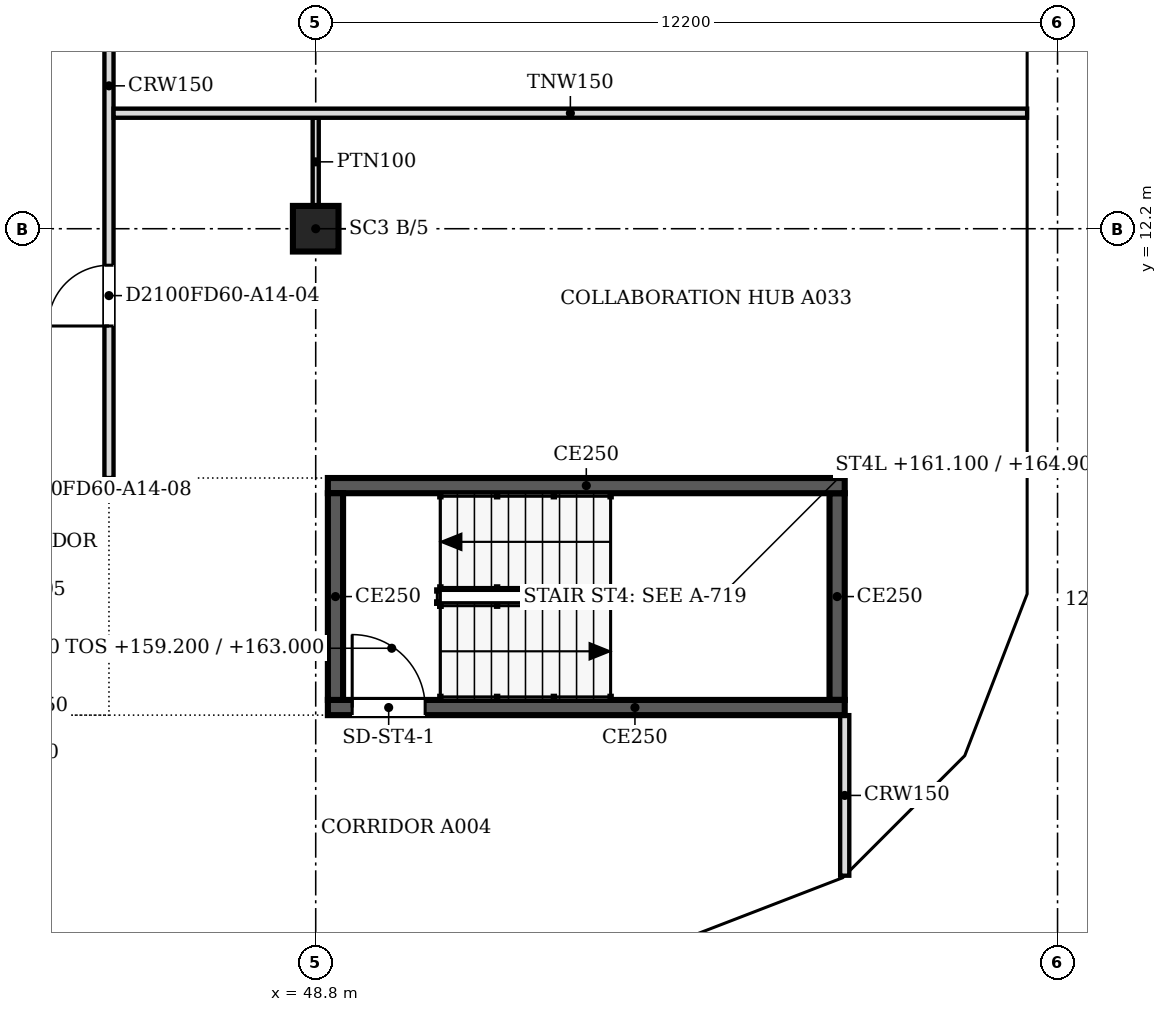
"""IFC4 building model, lengths in metres.
Left out: names, types, materials, properties, quantities, classifications, styles, units other than length and angle.
Written with IfcOpenShell. Run it as: python <this file> out.ifc"""

import sys

from ifc_helpers import new_model, si_unit, direction, frame, frame_2d, origin, origin_2d, place, context, subcontext, project, spatial, polyline, rectangle, outline, extrude, faceted_brep, source, transform, mapped, element, fill, save


model = new_model("IFC4")
c1 = context("Model", 3, precision=1e-05, world=origin(), true_north=direction((0.0, 1.0)))
c2 = subcontext(c1, "Body", "Model", "MODEL_VIEW")
j1 = project(units=[si_unit("LENGTHUNIT", "METRE"), si_unit("PLANEANGLEUNIT", "RADIAN")], contexts=[c1])
p1 = place(None, origin())
s1 = spatial("IfcSite", under=j1, at=p1, CompositionType="ELEMENT")
p2 = place(p1, origin())
s2 = spatial("IfcBuilding", under=s1, at=p2, CompositionType="ELEMENT")
p3 = place(p2, frame((0.0, 0.0, 159.2)))
s3 = spatial("IfcBuildingStorey", under=s2, at=p3, CompositionType="ELEMENT", Elevation=159.2)
p4 = place(p3, frame((48.8, 12.2, 0.0), z_axis=(0.0, 0.0, 1.0), x_axis=(1.0, 0.0, 0.0)))
e1 = element("IfcColumn", 1, at=p4, inside=s3, PredefinedType="COLUMN", context=c2, shape_type="SweptSolid", body=[
    extrude(rectangle(XDim=0.75, YDim=0.75, at=origin_2d()), origin(), (0.0, 0.0, 1.0), 3.6),
])
m1 = source(origin(), c2, "Body", "Brep", [
    faceted_brep([(2.95, -0.25, 0.0), (3.003, -0.25, 0.068), (3.003, -0.25, 7.532), (2.95, -0.25, 7.6), (0.0, -0.25, 3.8), (0.047, 0.25, 3.86), (2.898, 0.25, 7.532), (2.898, 0.25, 0.068), (0.047, 0.25, 3.74), (2.95, 0.0, 0.0), (2.95, 0.0, 7.6), (0.0, 0.0, 3.8)], [[[0, 1, 2, 3, 4]], [[5, 6, 7, 8]], [[1, 0, 9]], [[10, 3, 2]], [[6, 5, 11, 4, 3, 10]], [[8, 7, 9, 0, 4, 11]], [[8, 11, 5]], [[1, 9, 7, 6, 10, 2]]]),
])
p5 = place(p3, frame((54.854, 0.25, -3.8), z_axis=(0.0, 0.0, 1.0), x_axis=(0.932970071518, 0.359953949349, 0.0)))
e2 = element("IfcWall", 2, at=p5, inside=s3, PredefinedType="SOLIDWALL", context=c2, shape_type="MappedRepresentation", body=[
    mapped(m1, transform((0.0, 0.0, 0.0), scale=1.0)),
])
m2 = source(origin(), c2, "Body", "SweptSolid", [
    extrude(outline(polyline([(2.75, 6.935), (0.316, 3.8), (2.75, 0.665), (2.75, 6.935)])), frame((0.0, 0.26, 0.0), z_axis=(0.0, -1.0, 0.0), x_axis=(1.0, 0.0, 0.0)), (0.0, 0.0, 1.0), 0.52),
])
p6 = place(p5, origin())
e3 = element("IfcOpeningElement", 3, at=p6, cuts=e2, PredefinedType="OPENING", context=c2, shape_type="MappedRepresentation", body=[
    mapped(m2, transform((0.0, 0.0, 0.0), scale=1.0)),
])
m3 = source(origin(), c2, "Body", "Brep", [
    faceted_brep([(0.053, -0.25, 0.0), (2.997, -0.25, 3.8), (0.053, -0.25, 7.6), (0.0, -0.25, 7.532), (0.0, -0.25, 0.068), (0.106, 0.25, 7.532), (2.944, 0.25, 3.868), (2.944, 0.25, 3.732), (0.106, 0.25, 0.068), (2.997, 0.0, 3.8), (0.053, 0.0, 0.0), (0.053, 0.0, 7.6)], [[[0, 1, 2, 3, 4]], [[5, 6, 7, 8]], [[8, 7, 9, 1, 0, 10]], [[6, 5, 11, 2, 1, 9]], [[3, 2, 11]], [[10, 0, 4]], [[8, 10, 4, 3, 11, 5]], [[9, 7, 6]]]),
])
p7 = place(p3, frame((57.569, 1.274, -3.8), z_axis=(0.0, 0.0, 1.0), x_axis=(0.707066050402, 0.707147509625, 0.0)))
e4 = element("IfcWall", 4, at=p7, inside=s3, PredefinedType="SOLIDWALL", context=c2, shape_type="MappedRepresentation", body=[
    mapped(m3, transform((0.0, 0.0, 0.0), scale=1.0)),
])
m4 = source(origin(), c2, "Body", "SweptSolid", [
    extrude(outline(polyline([(0.253, 0.667), (2.681, 3.8), (0.253, 6.934), (0.253, 0.667)])), frame((0.0, 0.26, 0.0), z_axis=(0.0, -1.0, 0.0), x_axis=(1.0, 0.0, 0.0)), (0.0, 0.0, 1.0), 0.52),
])
p8 = place(p7, origin())
e5 = element("IfcOpeningElement", 5, at=p8, cuts=e4, PredefinedType="OPENING", context=c2, shape_type="MappedRepresentation", body=[
    mapped(m4, transform((0.0, 0.0, 0.0), scale=1.0)),
])
m5 = source(origin(), c2, "Body", "Brep", [
    faceted_brep([(2.95, -0.25, 0.0), (2.997, -0.25, 0.059), (2.997, -0.25, 7.541), (2.95, -0.25, 7.6), (0.0, -0.25, 3.8), (0.053, 0.25, 3.868), (2.904, 0.25, 7.54), (2.904, 0.25, 0.06), (0.053, 0.25, 3.732), (2.95, 0.0, 0.0), (2.95, 0.0, 7.6), (0.0, 0.0, 3.8)], [[[0, 1, 2, 3, 4]], [[5, 6, 7, 8]], [[1, 0, 9]], [[10, 3, 2]], [[6, 5, 11, 4, 3, 10]], [[8, 7, 9, 0, 4, 11]], [[8, 11, 5]], [[1, 9, 7, 6, 10, 2]]]),
])
p9 = place(p3, frame((59.688, 3.394, -3.8), z_axis=(0.0, 0.0, 1.0), x_axis=(0.359972353723, 0.932962970624, 0.0)))
e6 = element("IfcWall", 6, at=p9, inside=s3, PredefinedType="SOLIDWALL", context=c2, shape_type="MappedRepresentation", body=[
    mapped(m5, transform((0.0, 0.0, 0.0), scale=1.0)),
])
p10 = place(p9, origin())
e7 = element("IfcOpeningElement", 7, at=p10, cuts=e6, PredefinedType="OPENING", context=c2, shape_type="MappedRepresentation", body=[
    mapped(m2, transform((0.0, 0.0, 0.0), scale=1.0)),
])
m6 = source(origin(), c2, "Body", "Brep", [
    faceted_brep([(0.047, -0.25, 0.0), (3.05, -0.25, 3.8), (0.047, -0.25, 7.6), (0.0, -0.25, 7.54), (0.0, -0.25, 0.06), (0.093, 0.25, 7.541), (3.05, 0.25, 3.8), (0.093, 0.25, 0.059), (0.047, 0.0, 0.0), (0.047, 0.0, 7.6)], [[[0, 1, 2, 3, 4]], [[5, 6, 7]], [[7, 6, 1, 0, 8]], [[6, 5, 9, 2, 1]], [[3, 2, 9]], [[8, 0, 4]], [[7, 8, 4, 3, 9, 5]]]),
])
p11 = place(p3, frame((60.75, 6.1, -3.8), z_axis=(0.0, 0.0, 1.0), x_axis=(0.0, 1.0, 0.0)))
e8 = element("IfcWall", 8, at=p11, inside=s3, PredefinedType="SOLIDWALL", context=c2, shape_type="MappedRepresentation", body=[
    mapped(m6, transform((0.0, 0.0, 0.0), scale=1.0)),
])
m7 = source(origin(), c2, "Body", "SweptSolid", [
    extrude(outline(polyline([(0.247, 0.656), (2.731, 3.8), (0.247, 6.944), (0.247, 0.656)])), frame((0.0, 0.26, 0.0), z_axis=(0.0, -1.0, 0.0), x_axis=(1.0, 0.0, 0.0)), (0.0, 0.0, 1.0), 0.52),
])
p12 = place(p11, origin())
e9 = element("IfcOpeningElement", 9, at=p12, cuts=e8, PredefinedType="OPENING", context=c2, shape_type="MappedRepresentation", body=[
    mapped(m7, transform((0.0, 0.0, 0.0), scale=1.0)),
])
m8 = source(origin(), c2, "Body", "SweptSolid", [
    extrude(outline(polyline([(3.05, 0.0), (6.1, 3.8), (3.05, 7.6), (0.0, 3.8), (3.05, 0.0)])), frame((0.0, 0.25, 0.0), z_axis=(0.0, -1.0, 0.0), x_axis=(1.0, 0.0, 0.0)), (0.0, 0.0, 1.0), 0.5),
])
p13 = place(p3, frame((60.75, 9.15, -3.8), z_axis=(0.0, 0.0, 1.0), x_axis=(0.0, 1.0, 0.0)))
e10 = element("IfcWall", 10, at=p13, inside=s3, PredefinedType="SOLIDWALL", context=c2, shape_type="MappedRepresentation", body=[
    mapped(m8, transform((0.0, 0.0, 0.0), scale=1.0)),
])
m9 = source(origin(), c2, "Body", "SweptSolid", [
    extrude(outline(polyline([(3.05, 0.399), (5.78, 3.8), (3.05, 7.201), (0.321, 3.8), (3.05, 0.399)])), frame((0.0, 0.26, 0.0), z_axis=(0.0, -1.0, 0.0), x_axis=(1.0, 0.0, 0.0)), (0.0, 0.0, 1.0), 0.52),
])
p14 = place(p13, origin())
e11 = element("IfcOpeningElement", 11, at=p14, cuts=e10, PredefinedType="OPENING", context=c2, shape_type="MappedRepresentation", body=[
    mapped(m9, transform((0.0, 0.0, 0.0), scale=1.0)),
])
p15 = place(p2, frame((0.0, 0.0, 163.0)))
s4 = spatial("IfcBuildingStorey", under=s2, at=p15, CompositionType="ELEMENT", Elevation=163.0)
m10 = source(origin(), c2, "Body", "Brep", [
    faceted_brep([(0.047, -0.25, 0.0), (2.997, -0.25, 3.8), (0.047, -0.25, 7.6), (0.0, -0.25, 7.541), (0.0, -0.25, 0.059), (0.093, 0.25, 7.54), (2.944, 0.25, 3.868), (2.944, 0.25, 3.732), (0.093, 0.25, 0.06), (2.997, 0.0, 3.8), (0.047, 0.0, 0.0), (0.047, 0.0, 7.6)], [[[0, 1, 2, 3, 4]], [[5, 6, 7, 8]], [[8, 7, 9, 1, 0, 10]], [[6, 5, 11, 2, 1, 9]], [[3, 2, 11]], [[10, 0, 4]], [[8, 10, 4, 3, 11, 5]], [[9, 7, 6]]]),
])
p16 = place(p15, frame((54.81, 0.233, -3.8), z_axis=(0.0, 0.0, 1.0), x_axis=(0.932990326376, 0.359901446078, 0.0)))
e12 = element("IfcWall", 12, at=p16, inside=s4, PredefinedType="SOLIDWALL", context=c2, shape_type="MappedRepresentation", body=[
    mapped(m10, transform((0.0, 0.0, 0.0), scale=1.0)),
])
m11 = source(origin(), c2, "Body", "SweptSolid", [
    extrude(outline(polyline([(0.247, 0.665), (2.681, 3.8), (0.247, 6.935), (0.247, 0.665)])), frame((0.0, 0.26, 0.0), z_axis=(0.0, -1.0, 0.0), x_axis=(1.0, 0.0, 0.0)), (0.0, 0.0, 1.0), 0.52),
])
p17 = place(p16, origin())
e13 = element("IfcOpeningElement", 13, at=p17, cuts=e12, PredefinedType="OPENING", context=c2, shape_type="MappedRepresentation", body=[
    mapped(m11, transform((0.0, 0.0, 0.0), scale=1.0)),
])
m12 = source(origin(), c2, "Body", "Brep", [
    faceted_brep([(2.944, -0.25, 0.0), (2.997, -0.25, 0.068), (2.997, -0.25, 7.532), (2.944, -0.25, 7.6), (0.0, -0.25, 3.8), (0.053, 0.25, 3.868), (2.891, 0.25, 7.532), (2.891, 0.25, 0.068), (0.053, 0.25, 3.732), (2.944, 0.0, 0.0), (2.944, 0.0, 7.6), (0.0, 0.0, 3.8)], [[[0, 1, 2, 3, 4]], [[5, 6, 7, 8]], [[1, 0, 9]], [[10, 3, 2]], [[6, 5, 11, 4, 3, 10]], [[8, 7, 9, 0, 4, 11]], [[8, 11, 5]], [[1, 9, 7, 6, 10, 2]]]),
])
p18 = place(p15, frame((57.606, 1.312, -3.8), z_axis=(0.0, 0.0, 1.0), x_axis=(0.707147509625, 0.707066050402, 0.0)))
e14 = element("IfcWall", 14, at=p18, inside=s4, PredefinedType="SOLIDWALL", context=c2, shape_type="MappedRepresentation", body=[
    mapped(m12, transform((0.0, 0.0, 0.0), scale=1.0)),
])
m13 = source(origin(), c2, "Body", "SweptSolid", [
    extrude(outline(polyline([(2.744, 6.934), (0.316, 3.8), (2.744, 0.666), (2.744, 6.934)])), frame((0.0, 0.26, 0.0), z_axis=(0.0, -1.0, 0.0), x_axis=(1.0, 0.0, 0.0)), (0.0, 0.0, 1.0), 0.52),
])
p19 = place(p18, origin())
e15 = element("IfcOpeningElement", 15, at=p19, cuts=e14, PredefinedType="OPENING", context=c2, shape_type="MappedRepresentation", body=[
    mapped(m13, transform((0.0, 0.0, 0.0), scale=1.0)),
])
m14 = source(origin(), c2, "Body", "Brep", [
    faceted_brep([(0.053, -0.25, 0.0), (3.003, -0.25, 3.8), (0.053, -0.25, 7.6), (0.0, -0.25, 7.532), (0.0, -0.25, 0.068), (0.106, 0.25, 7.532), (2.957, 0.25, 3.86), (2.957, 0.25, 3.74), (0.106, 0.25, 0.068), (3.003, 0.0, 3.8), (0.053, 0.0, 0.0), (0.053, 0.0, 7.6)], [[[0, 1, 2, 3, 4]], [[5, 6, 7, 8]], [[8, 7, 9, 1, 0, 10]], [[6, 5, 11, 2, 1, 9]], [[3, 2, 11]], [[10, 0, 4]], [[8, 10, 4, 3, 11, 5]], [[9, 7, 6]]]),
])
p20 = place(p15, frame((59.669, 3.344, -3.8), z_axis=(0.0, 0.0, 1.0), x_axis=(0.35992665181, 0.932980602862, 0.0)))
e16 = element("IfcWall", 16, at=p20, inside=s4, PredefinedType="SOLIDWALL", context=c2, shape_type="MappedRepresentation", body=[
    mapped(m14, transform((0.0, 0.0, 0.0), scale=1.0)),
])
m15 = source(origin(), c2, "Body", "SweptSolid", [
    extrude(outline(polyline([(0.253, 0.665), (2.687, 3.8), (0.253, 6.935), (0.253, 0.665)])), frame((0.0, 0.26, 0.0), z_axis=(0.0, -1.0, 0.0), x_axis=(1.0, 0.0, 0.0)), (0.0, 0.0, 1.0), 0.52),
])
p21 = place(p20, origin())
e17 = element("IfcOpeningElement", 17, at=p21, cuts=e16, PredefinedType="OPENING", context=c2, shape_type="MappedRepresentation", body=[
    mapped(m15, transform((0.0, 0.0, 0.0), scale=1.0)),
])
m16 = source(origin(), c2, "Body", "Brep", [
    faceted_brep([(3.003, -0.25, 0.0), (6.053, -0.25, 3.8), (3.003, -0.25, 7.6), (0.0, -0.25, 3.8), (0.047, 0.25, 3.859), (3.003, 0.25, 7.6), (6.053, 0.25, 3.8), (3.003, 0.25, 0.0), (0.047, 0.25, 3.741), (0.0, 0.0, 3.8)], [[[0, 1, 2, 3]], [[4, 5, 6, 7, 8]], [[7, 6, 1, 0]], [[6, 5, 2, 1]], [[5, 4, 9, 3, 2]], [[8, 7, 0, 3, 9]], [[8, 9, 4]]]),
])
p22 = place(p15, frame((60.75, 6.146, -3.8), z_axis=(0.0, 0.0, 1.0), x_axis=(0.0, 1.0, 0.0)))
e18 = element("IfcWall", 18, at=p22, inside=s4, PredefinedType="SOLIDWALL", context=c2, shape_type="MappedRepresentation", body=[
    mapped(m16, transform((0.0, 0.0, 0.0), scale=1.0)),
])
m17 = source(origin(), c2, "Body", "SweptSolid", [
    extrude(outline(polyline([(3.005, 0.401), (5.733, 3.8), (3.005, 7.199), (0.319, 3.8), (3.005, 0.401)])), frame((0.0, 0.26, 0.0), z_axis=(0.0, -1.0, 0.0), x_axis=(1.0, 0.0, 0.0)), (0.0, 0.0, 1.0), 0.52),
])
p23 = place(p22, origin())
e19 = element("IfcOpeningElement", 19, at=p23, cuts=e18, PredefinedType="OPENING", context=c2, shape_type="MappedRepresentation", body=[
    mapped(m17, transform((0.0, 0.0, 0.0), scale=1.0)),
])
p24 = place(p15, frame((60.75, 12.2, -3.8), z_axis=(0.0, 0.0, 1.0), x_axis=(0.0, 1.0, 0.0)))
e20 = element("IfcWall", 20, at=p24, inside=s4, PredefinedType="SOLIDWALL", context=c2, shape_type="MappedRepresentation", body=[
    mapped(m8, transform((0.0, 0.0, 0.0), scale=1.0)),
])
p25 = place(p24, origin())
e21 = element("IfcOpeningElement", 21, at=p25, cuts=e20, PredefinedType="OPENING", context=c2, shape_type="MappedRepresentation", body=[
    mapped(m9, transform((0.0, 0.0, 0.0), scale=1.0)),
])
p26 = place(p3, frame((57.5, 4.325, 0.0), z_axis=(0.0, 0.0, 1.0), x_axis=(-1.0, 0.0, 0.0)))
e22 = element("IfcWall", 22, at=p26, inside=s3, PredefinedType="SOLIDWALL", context=c2, shape_type="SweptSolid", body=[
    extrude(rectangle(XDim=8.5, YDim=0.25, at=frame_2d((4.25, 0.0))), origin(), (0.0, 0.0, 1.0), 3.8),
])
m18 = source(origin(), c2, "Body", "SweptSolid", [
    extrude(rectangle(XDim=1.2, YDim=2.1, at=frame_2d((0.6, 1.05))), frame((0.0, 0.135, 0.0), z_axis=(0.0, -1.0, 0.0), x_axis=(1.0, 0.0, 0.0)), (0.0, 0.0, 1.0), 0.27),
])
p27 = place(p26, frame((6.9, 0.0, 0.0)))
e23 = element("IfcOpeningElement", 23, at=p27, cuts=e22, PredefinedType="OPENING", context=c2, shape_type="MappedRepresentation", body=[
    mapped(m18, transform((0.0, 0.0, 0.0), scale=1.0)),
])
p28 = place(p3, frame((49.125, 4.45, 0.0), z_axis=(0.0, 0.0, 1.0), x_axis=(0.0, 1.0, 0.0)))
e24 = element("IfcWall", 24, at=p28, inside=s3, PredefinedType="SOLIDWALL", context=c2, shape_type="SweptSolid", body=[
    extrude(rectangle(XDim=3.4, YDim=0.25, at=frame_2d((1.7, 0.0))), origin(), (0.0, 0.0, 1.0), 3.8),
])
p29 = place(p3, frame((49.0, 7.975, 0.0), z_axis=(0.0, 0.0, 1.0), x_axis=(1.0, 0.0, 0.0)))
e25 = element("IfcWall", 25, at=p29, inside=s3, PredefinedType="SOLIDWALL", context=c2, shape_type="SweptSolid", body=[
    extrude(rectangle(XDim=8.5, YDim=0.25, at=frame_2d((4.25, 0.0))), origin(), (0.0, 0.0, 1.0), 3.8),
])
p30 = place(p3, frame((57.375, 7.85, 0.0), z_axis=(0.0, 0.0, 1.0), x_axis=(0.0, -1.0, 0.0)))
e26 = element("IfcWall", 26, at=p30, inside=s3, PredefinedType="SOLIDWALL", context=c2, shape_type="SweptSolid", body=[
    extrude(rectangle(XDim=3.4, YDim=0.25, at=frame_2d((1.7, 0.0))), origin(), (0.0, 0.0, 1.0), 3.8),
])
p31 = place(p3, frame((57.5, 1.559, 0.0), z_axis=(0.0, 0.0, 1.0), x_axis=(0.0, 1.0, 0.0)))
e27 = element("IfcWall", 27, at=p31, inside=s3, PredefinedType="PARTITIONING", context=c2, shape_type="SweptSolid", body=[
    extrude(rectangle(XDim=2.641, YDim=0.15, at=frame_2d((1.32, 0.0))), origin(), (0.0, 0.0, 1.0), 3.067),
])
p32 = place(p3, frame((45.4, 21.924, 0.0), z_axis=(0.0, 0.0, 1.0), x_axis=(0.0, -1.0, 0.0)))
e28 = element("IfcWall", 28, at=p32, inside=s3, PredefinedType="PARTITIONING", context=c2, shape_type="SweptSolid", body=[
    extrude(rectangle(XDim=13.824, YDim=0.15, at=frame_2d((6.912, 0.0))), origin(), (0.0, 0.0, 1.0), 3.067),
])
m19 = source(origin(), c2, "Body", "SweptSolid", [
    extrude(rectangle(XDim=1.0, YDim=2.1, at=frame_2d((0.5, 1.05))), frame((0.0, 0.085, 0.0), z_axis=(0.0, -1.0, 0.0), x_axis=(1.0, 0.0, 0.0)), (0.0, 0.0, 1.0), 0.17),
])
p33 = place(p32, frame((10.324, 0.0, 0.0)))
e29 = element("IfcOpeningElement", 29, at=p33, cuts=e28, PredefinedType="OPENING", context=c2, shape_type="MappedRepresentation", body=[
    mapped(m19, transform((0.0, 0.0, 0.0), scale=1.0)),
])
p34 = place(p32, frame((3.424, 0.0, 0.0)))
e30 = element("IfcOpeningElement", 30, at=p34, cuts=e28, PredefinedType="OPENING", context=c2, shape_type="MappedRepresentation", body=[
    mapped(m19, transform((0.0, 0.0, 0.0), scale=1.0)),
])
p35 = place(p3, frame((48.8, 12.575, 0.0), z_axis=(0.0, 0.0, 1.0), x_axis=(0.0, 1.0, 0.0)))
e31 = element("IfcWall", 31, at=p35, inside=s3, PredefinedType="PARTITIONING", context=c2, shape_type="SweptSolid", body=[
    extrude(rectangle(XDim=1.45, YDim=0.1, at=frame_2d((0.725, 0.0))), origin(), (0.0, 0.0, 1.0), 3.067),
])
p36 = place(p3, frame((45.476, 14.1, 0.0), z_axis=(0.0, 0.0, 1.0), x_axis=(1.0, 0.0, 0.0)))
e32 = element("IfcWall", 32, at=p36, inside=s3, PredefinedType="PARTITIONING", context=c2, shape_type="SweptSolid", body=[
    extrude(rectangle(XDim=15.024, YDim=0.15, at=frame_2d((7.512, 0.0))), origin(), (0.0, 0.0, 1.0), 3.067),
])
m20 = source(origin(), c2, "Body", "SweptSolid", [
    extrude(rectangle(XDim=1.2, YDim=2.1, at=frame_2d((0.6, 1.05))), frame((0.0, 0.025, 0.0), z_axis=(0.0, -1.0, 0.0), x_axis=(1.0, 0.0, 0.0)), (0.0, 0.0, 1.0), 0.05),
])
p37 = place(p27, origin())
e33 = element("IfcDoor", 33, at=p37, inside=s3, OperationType="SINGLE_SWING_RIGHT", PredefinedType="DOOR", context=c2, shape_type="MappedRepresentation", body=[
    mapped(m20, transform((0.0, 0.0, 0.0), scale=1.0)),
])
fill(e23, e33)
m21 = source(origin(), c2, "Body", "SweptSolid", [
    extrude(rectangle(XDim=1.0, YDim=2.1, at=frame_2d((0.5, 1.05))), frame((0.0, 0.025, 0.0), z_axis=(0.0, -1.0, 0.0), x_axis=(1.0, 0.0, 0.0)), (0.0, 0.0, 1.0), 0.05),
])
p38 = place(p33, origin())
e34 = element("IfcDoor", 34, at=p38, inside=s3, OperationType="SINGLE_SWING_RIGHT", PredefinedType="DOOR", context=c2, shape_type="MappedRepresentation", body=[
    mapped(m21, transform((0.0, 0.0, 0.0), scale=1.0)),
])
fill(e29, e34)
save(model, sys.argv[1])
